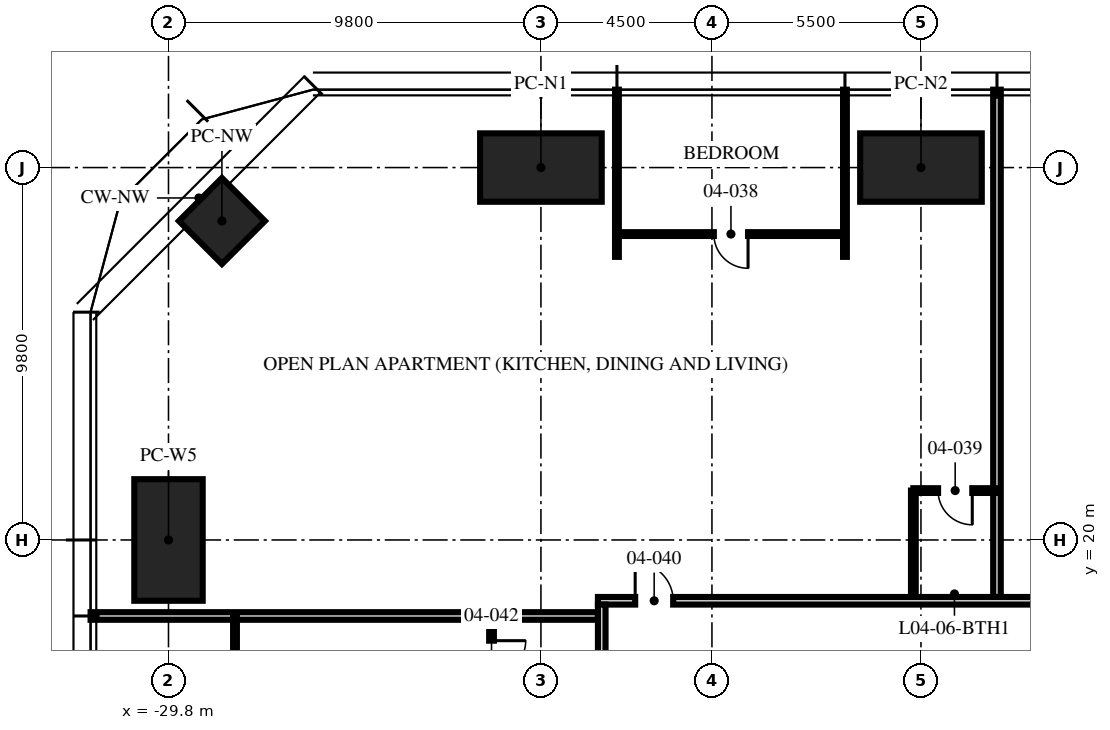
"""IFC4 building model, lengths in metres.
Left out: names, types, materials, properties, quantities, classifications, styles, units other than length and angle.
Written with IfcOpenShell. Run it as: python <this file> out.ifc"""

import sys

from ifc_helpers import new_model, si_unit, direction, frame, frame_2d, origin, origin_2d, place, context, subcontext, project, spatial, rectangle, hollow_rectangle, extrude, element, fill, save


model = new_model("IFC4")
c1 = context("Model", 3, precision=1e-05, world=origin(), true_north=direction((0.0, 1.0)))
c2 = subcontext(c1, "Body", "Model", "MODEL_VIEW")
j1 = project(units=[si_unit("LENGTHUNIT", "METRE"), si_unit("PLANEANGLEUNIT", "RADIAN")], contexts=[c1])
p1 = place(None, origin())
s1 = spatial("IfcSite", under=j1, at=p1, CompositionType="ELEMENT")
p2 = place(p1, origin())
s2 = spatial("IfcBuilding", under=s1, at=p2, CompositionType="ELEMENT")
p3 = place(p2, frame((0.0, 0.0, 21.0)))
s3 = spatial("IfcBuildingStorey", under=s2, at=p3, CompositionType="ELEMENT", Elevation=21.0)
for number, where, z_axis, x_axis in (
    (1, (-20.0, 29.8, 0.0), (0.0, 0.0, 1.0), (1.0, 0.0, 0.0)),
    (2, (-10.0, 29.8, 0.0), (0.0, 0.0, 1.0), (1.0, 0.0, 0.0)),
    (3, (-29.8, 20.0, 0.0), (0.0, 0.0, 1.0), (0.0, 1.0, 0.0)),
):
    element("IfcColumn", number, at=place(p3, frame(where, z_axis=z_axis, x_axis=x_axis)), inside=s3, PredefinedType="COLUMN", context=c2, shape_type="SweptSolid", body=[
        extrude(hollow_rectangle(XDim=3.2, YDim=1.8, WallThickness=0.2, at=origin_2d()), origin(), (0.0, 0.0, 1.0), 3.75),
    ])
p4 = place(p3, frame((-28.394, 28.394, 0.0), z_axis=(0.0, 0.0, 1.0), x_axis=(0.707106781187, 0.707106781187, 0.0)))
e4 = element("IfcColumn", 4, at=p4, inside=s3, PredefinedType="COLUMN", context=c2, shape_type="SweptSolid", body=[
    extrude(hollow_rectangle(XDim=1.6, YDim=1.6, WallThickness=0.1, at=origin_2d()), origin(), (0.0, 0.0, 1.0), 3.75),
])
p5 = place(p3, frame((-8.0, 18.5, 0.0), z_axis=(0.0, 0.0, 1.0), x_axis=(0.0, 1.0, 0.0)))
e5 = element("IfcWall", 5, at=p5, inside=s3, PredefinedType="PARTITIONING", context=c2, shape_type="SweptSolid", body=[
    extrude(rectangle(XDim=13.35, YDim=0.2, at=frame_2d((6.675, 0.0))), origin(), (0.0, 0.0, 1.0), 2.71),
])
for number, where, z_axis, x_axis in (
    (6, (-12.0, 27.45, 0.0), (0.0, 0.0, 1.0), (0.0, 1.0, 0.0)),
    (7, (-18.0, 27.45, 0.0), (0.0, 0.0, 1.0), (0.0, 1.0, 0.0)),
):
    element("IfcWall", number, at=place(p3, frame(where, z_axis=z_axis, x_axis=x_axis)), inside=s3, PredefinedType="PARTITIONING", context=c2, shape_type="SweptSolid", body=[
        extrude(rectangle(XDim=4.4, YDim=0.1, at=frame_2d((2.2, 0.0))), origin(), (0.0, 0.0, 1.0), 2.71),
    ])
p6 = place(p3, frame((-18.5, 18.0, 0.0), z_axis=(0.0, 0.0, 1.0), x_axis=(-1.0, 0.0, 0.0)))
e8 = element("IfcWall", 8, at=p6, inside=s3, PredefinedType="PARTITIONING", context=c2, shape_type="SweptSolid", body=[
    extrude(rectangle(XDim=13.35, YDim=0.2, at=frame_2d((6.675, 0.0))), origin(), (0.0, 0.0, 1.0), 2.3),
])
p7 = place(p3, frame((-12.0, 28.05, 0.0), z_axis=(0.0, 0.0, 1.0), x_axis=(-1.0, 0.0, 0.0)))
e9 = element("IfcWall", 9, at=p7, inside=s3, PredefinedType="PARTITIONING", context=c2, shape_type="SweptSolid", body=[
    extrude(rectangle(XDim=6.0, YDim=0.1, at=frame_2d((3.0, 0.0))), origin(), (0.0, 0.0, 1.0), 2.61),
])
p8 = place(p7, frame((2.55, 0.0, 0.0)))
e10 = element("IfcOpeningElement", 10, at=p8, cuts=e9, PredefinedType="OPENING", context=c2, shape_type="SweptSolid", body=[
    extrude(rectangle(XDim=0.9, YDim=2.1, at=frame_2d((0.45, 1.05))), frame((0.0, 0.06, 0.0), z_axis=(0.0, -1.0, 0.0), x_axis=(1.0, 0.0, 0.0)), (0.0, 0.0, 1.0), 0.12),
])
p9 = place(p3, frame((-8.0, 21.3, 0.0), z_axis=(0.0, 0.0, 1.0), x_axis=(-1.0, 0.0, 0.0)))
e11 = element("IfcWall", 11, at=p9, inside=s3, PredefinedType="PARTITIONING", context=c2, shape_type="SweptSolid", body=[
    extrude(rectangle(XDim=2.2, YDim=0.125, at=frame_2d((1.1, 0.0))), origin(), (0.0, 0.0, 1.0), 2.492),
])
p10 = place(p9, frame((0.65, 0.0, 0.0)))
e12 = element("IfcOpeningElement", 12, at=p10, cuts=e11, PredefinedType="OPENING", context=c2, shape_type="SweptSolid", body=[
    extrude(rectangle(XDim=0.9, YDim=2.1, at=frame_2d((0.45, 1.05))), frame((0.0, 0.073, 0.0), z_axis=(0.0, -1.0, 0.0), x_axis=(1.0, 0.0, 0.0)), (0.0, 0.0, 1.0), 0.145),
])
p11 = place(p3, frame((-10.2, 18.5, 0.0), z_axis=(0.0, 0.0, 1.0), x_axis=(0.0, 1.0, 0.0)))
e13 = element("IfcWall", 13, at=p11, inside=s3, PredefinedType="PARTITIONING", context=c2, shape_type="SweptSolid", body=[
    extrude(rectangle(XDim=2.8, YDim=0.125, at=frame_2d((1.4, 0.0))), origin(), (0.0, 0.0, 1.0), 2.492),
])
p12 = place(p3, frame((-28.05, 18.0, 0.0), z_axis=(0.0, 0.0, 1.0), x_axis=(0.0, -1.0, 0.0)))
e14 = element("IfcWall", 14, at=p12, inside=s3, PredefinedType="PARTITIONING", context=c2, shape_type="SweptSolid", body=[
    extrude(rectangle(XDim=6.0, YDim=0.1, at=frame_2d((3.0, 0.0))), origin(), (0.0, 0.0, 1.0), 2.61),
])
p13 = place(p12, frame((2.55, 0.0, 0.0)))
e15 = element("IfcOpeningElement", 15, at=p13, cuts=e14, PredefinedType="OPENING", context=c2, shape_type="SweptSolid", body=[
    extrude(rectangle(XDim=0.9, YDim=2.1, at=frame_2d((0.45, 1.05))), frame((0.0, 0.06, 0.0), z_axis=(0.0, -1.0, 0.0), x_axis=(1.0, 0.0, 0.0)), (0.0, 0.0, 1.0), 0.12),
])
p14 = place(p3, frame((-21.3, 18.0, 0.0), z_axis=(0.0, 0.0, 1.0), x_axis=(0.0, -1.0, 0.0)))
e16 = element("IfcWall", 16, at=p14, inside=s3, PredefinedType="PARTITIONING", context=c2, shape_type="SweptSolid", body=[
    extrude(rectangle(XDim=2.2, YDim=0.125, at=frame_2d((1.1, 0.0))), origin(), (0.0, 0.0, 1.0), 3.5),
])
p15 = place(p14, frame((0.65, 0.0, 0.0)))
e17 = element("IfcOpeningElement", 17, at=p15, cuts=e16, PredefinedType="OPENING", context=c2, shape_type="SweptSolid", body=[
    extrude(rectangle(XDim=0.9, YDim=2.1, at=frame_2d((0.45, 1.05))), frame((0.0, 0.073, 0.0), z_axis=(0.0, -1.0, 0.0), x_axis=(1.0, 0.0, 0.0)), (0.0, 0.0, 1.0), 0.145),
])
p16 = place(p3, frame((-18.5, 18.4, 0.0), z_axis=(0.0, 0.0, 1.0), x_axis=(1.0, 0.0, 0.0)))
e18 = element("IfcWall", 18, at=p16, inside=s3, PredefinedType="PARTITIONING", context=c2, shape_type="SweptSolid", body=[
    extrude(rectangle(XDim=14.5, YDim=0.2, at=frame_2d((7.25, 0.0))), origin(), (0.0, 0.0, 1.0), 2.3),
])
p17 = place(p16, frame((0.98, 0.0, 0.0)))
e19 = element("IfcOpeningElement", 19, at=p17, cuts=e18, PredefinedType="OPENING", context=c2, shape_type="SweptSolid", body=[
    extrude(rectangle(XDim=1.0, YDim=2.2, at=frame_2d((0.5, 1.1))), frame((0.0, 0.11, 0.0), z_axis=(0.0, -1.0, 0.0), x_axis=(1.0, 0.0, 0.0)), (0.0, 0.0, 1.0), 0.22),
])
p18 = place(p3, frame((-18.4, 18.3, 0.0), z_axis=(0.0, 0.0, 1.0), x_axis=(0.0, -1.0, 0.0)))
e20 = element("IfcWall", 20, at=p18, inside=s3, PredefinedType="PARTITIONING", context=c2, shape_type="SweptSolid", body=[
    extrude(rectangle(XDim=36.6, YDim=0.2, at=frame_2d((18.3, 0.0))), origin(), (0.0, 0.0, 1.0), 2.3),
])
p19 = place(p18, frame((8.57, 0.0, 0.0)))
e21 = element("IfcOpeningElement", 21, at=p19, cuts=e20, PredefinedType="OPENING", context=c2, shape_type="SweptSolid", body=[
    extrude(rectangle(XDim=1.0, YDim=2.2, at=frame_2d((0.5, 1.1))), frame((0.0, 0.11, 0.0), z_axis=(0.0, -1.0, 0.0), x_axis=(1.0, 0.0, 0.0)), (0.0, 0.0, 1.0), 0.22),
])
p20 = place(p18, frame((24.57, 0.0, 0.0)))
e22 = element("IfcOpeningElement", 22, at=p20, cuts=e20, PredefinedType="OPENING", context=c2, shape_type="SweptSolid", body=[
    extrude(rectangle(XDim=1.0, YDim=2.2, at=frame_2d((0.5, 1.1))), frame((0.0, 0.11, 0.0), z_axis=(0.0, -1.0, 0.0), x_axis=(1.0, 0.0, 0.0)), (0.0, 0.0, 1.0), 0.22),
])
p21 = place(p18, frame((28.87, 0.0, 0.0)))
e23 = element("IfcOpeningElement", 23, at=p21, cuts=e20, PredefinedType="OPENING", context=c2, shape_type="SweptSolid", body=[
    extrude(rectangle(XDim=1.0, YDim=2.2, at=frame_2d((0.5, 1.1))), frame((0.0, 0.11, 0.0), z_axis=(0.0, -1.0, 0.0), x_axis=(1.0, 0.0, 0.0)), (0.0, 0.0, 1.0), 0.22),
])
p22 = place(p18, frame((34.82, 0.0, 0.0)))
e24 = element("IfcOpeningElement", 24, at=p22, cuts=e20, PredefinedType="OPENING", context=c2, shape_type="SweptSolid", body=[
    extrude(rectangle(XDim=1.0, YDim=2.2, at=frame_2d((0.5, 1.1))), frame((0.0, 0.11, 0.0), z_axis=(0.0, -1.0, 0.0), x_axis=(1.0, 0.0, 0.0)), (0.0, 0.0, 1.0), 0.22),
])
p23 = place(p8, origin())
e25 = element("IfcDoor", 25, at=p23, inside=s3, OperationType="SINGLE_SWING_LEFT", PredefinedType="DOOR", context=c2, shape_type="SweptSolid", body=[
    extrude(rectangle(XDim=0.9, YDim=2.1, at=frame_2d((0.45, 1.05))), frame((0.0, 0.025, 0.0), z_axis=(0.0, -1.0, 0.0), x_axis=(1.0, 0.0, 0.0)), (0.0, 0.0, 1.0), 0.05),
])
fill(e10, e25)
p24 = place(p10, origin())
e26 = element("IfcDoor", 26, at=p24, inside=s3, OperationType="SINGLE_SWING_LEFT", PredefinedType="DOOR", context=c2, shape_type="SweptSolid", body=[
    extrude(rectangle(XDim=0.9, YDim=2.1, at=frame_2d((0.45, 1.05))), frame((0.0, 0.025, 0.0), z_axis=(0.0, -1.0, 0.0), x_axis=(1.0, 0.0, 0.0)), (0.0, 0.0, 1.0), 0.05),
])
fill(e12, e26)
p25 = place(p17, origin())
e27 = element("IfcDoor", 27, at=p25, inside=s3, OperationType="SINGLE_SWING_LEFT", PredefinedType="DOOR", context=c2, shape_type="SweptSolid", body=[
    extrude(rectangle(XDim=1.0, YDim=2.2, at=frame_2d((0.5, 1.1))), frame((0.0, 0.025, 0.0), z_axis=(0.0, -1.0, 0.0), x_axis=(1.0, 0.0, 0.0)), (0.0, 0.0, 1.0), 0.05),
])
fill(e19, e27)
p26 = place(p15, origin())
e28 = element("IfcDoor", 28, at=p26, inside=s3, OperationType="SINGLE_SWING_LEFT", PredefinedType="DOOR", context=c2, shape_type="SweptSolid", body=[
    extrude(rectangle(XDim=0.9, YDim=2.1, at=frame_2d((0.45, 1.05))), frame((0.0, 0.025, 0.0), z_axis=(0.0, -1.0, 0.0), x_axis=(1.0, 0.0, 0.0)), (0.0, 0.0, 1.0), 0.05),
])
fill(e17, e28)
save(model, sys.argv[1])
